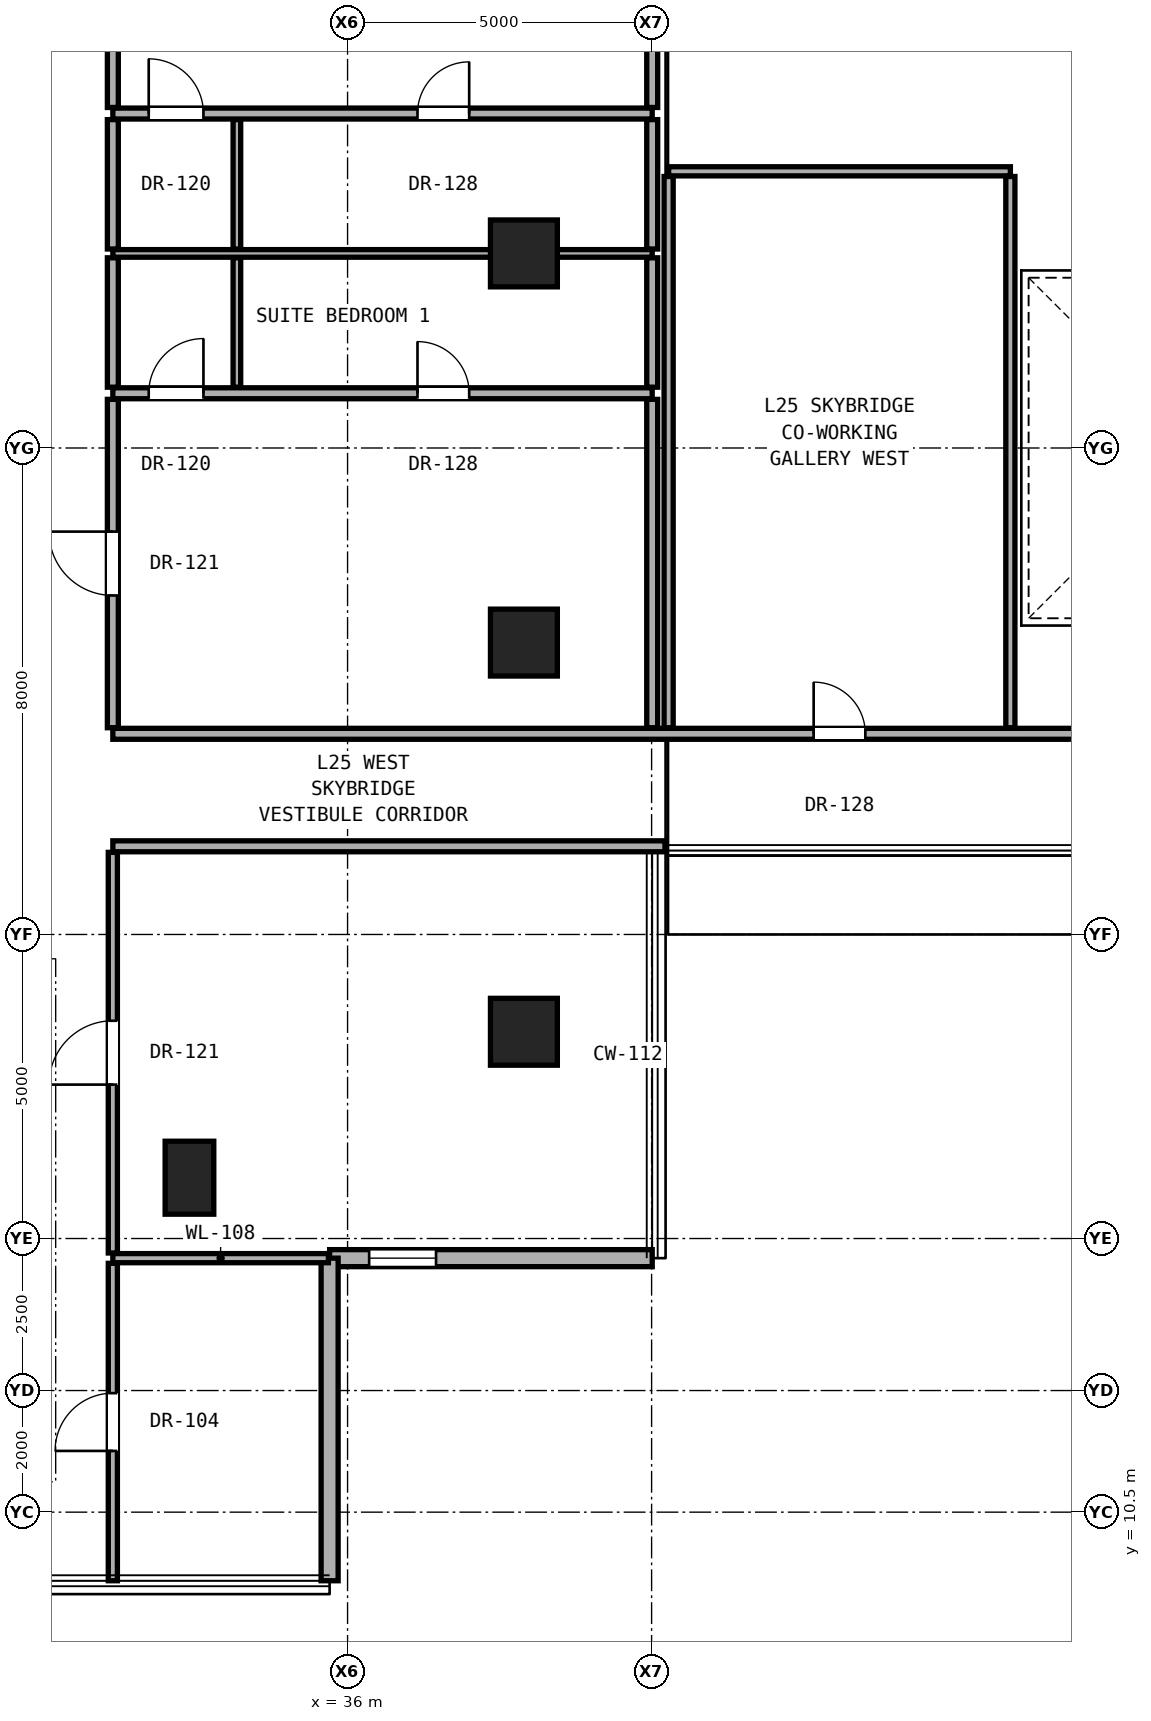
"""IFC4 building model, lengths in metres.
Left out: names, types, materials, properties, quantities, classifications, styles, units other than length and angle.
Written with IfcOpenShell. Run it as: python <this file> out.ifc"""

import sys

from ifc_helpers import new_model, si_unit, direction, frame, frame_2d, origin, origin_2d, place, context, subcontext, project, spatial, rectangle, hollow_rectangle, extrude, element, fill, save


model = new_model("IFC4")
c1 = context("Model", 3, precision=1e-05, world=origin(), true_north=direction((0.0, 1.0)))
c2 = subcontext(c1, "Body", "Model", "MODEL_VIEW")
j1 = project(units=[si_unit("LENGTHUNIT", "METRE"), si_unit("PLANEANGLEUNIT", "RADIAN")], contexts=[c1])
p1 = place(None, origin())
s1 = spatial("IfcSite", under=j1, at=p1, CompositionType="ELEMENT")
p2 = place(p1, origin())
s2 = spatial("IfcBuilding", under=s1, at=p2, CompositionType="ELEMENT")
p3 = place(p2, frame((0.0, 0.0, 91.7)))
s3 = spatial("IfcBuildingStorey", under=s2, at=p3, CompositionType="ELEMENT", Elevation=91.7)
for number, where, z_axis, x_axis in (
    (1, (38.9, 18.4, 0.0), (0.0, 0.0, 1.0), (1.0, 0.0, 0.0)),
    (2, (38.9, 24.8, 0.0), (0.0, 0.0, 1.0), (1.0, 0.0, 0.0)),
    (3, (38.9, 31.2, 0.0), (0.0, 0.0, 1.0), (1.0, 0.0, 0.0)),
):
    element("IfcColumn", number, at=place(p3, frame(where, z_axis=z_axis, x_axis=x_axis)), inside=s3, PredefinedType="COLUMN", context=c2, shape_type="SweptSolid", body=[
        extrude(hollow_rectangle(XDim=1.1, YDim=1.1, WallThickness=0.06, at=origin_2d()), origin(), (0.0, 0.0, 1.0), 3.3),
    ])
p4 = place(p3, frame((33.4, 16.0, 0.0), z_axis=(0.0, 0.0, 1.0), x_axis=(1.0, 0.0, 0.0)))
e4 = element("IfcColumn", 4, at=p4, inside=s3, PredefinedType="PILASTER", context=c2, shape_type="SweptSolid", body=[
    extrude(rectangle(XDim=0.8, YDim=1.2, at=origin_2d()), origin(), (0.0, 0.0, 1.0), 3.3),
])
p5 = place(p3, frame((35.705, 14.677, 0.0), z_axis=(0.0, 0.0, 1.0), x_axis=(1.0, 0.0, 0.0)))
e5 = element("IfcWall", 5, at=p5, inside=s3, PredefinedType="SOLIDWALL", context=c2, shape_type="SweptSolid", body=[
    extrude(rectangle(XDim=5.305, YDim=0.28, at=frame_2d((2.652, 0.0))), origin(), (0.0, 0.0, 1.0), 3.06),
])
p6 = place(p5, frame((0.65, 0.0, 0.85)))
e6 = element("IfcOpeningElement", 6, at=p6, cuts=e5, PredefinedType="OPENING", context=c2, shape_type="SweptSolid", body=[
    extrude(rectangle(XDim=1.1, YDim=2.0, at=frame_2d((0.55, 1.0))), frame((0.0, 0.15, 0.0), z_axis=(0.0, -1.0, 0.0), x_axis=(1.0, 0.0, 0.0)), (0.0, 0.0, 1.0), 0.3),
])
p7 = place(p3, frame((35.705, 9.372, 0.0), z_axis=(0.0, 0.0, 1.0), x_axis=(0.0, 1.0, 0.0)))
e7 = element("IfcWall", 7, at=p7, inside=s3, PredefinedType="SOLIDWALL", context=c2, shape_type="SweptSolid", body=[
    extrude(rectangle(XDim=5.305, YDim=0.28, at=frame_2d((2.652, 0.0))), origin(), (0.0, 0.0, 1.0), 3.06),
])
p8 = place(p3, frame((32.14, 14.677, 0.0), z_axis=(0.0, 0.0, 1.0), x_axis=(1.0, 0.0, 0.0)))
e8 = element("IfcWall", 8, at=p8, inside=s3, PredefinedType="PARTITIONING", context=c2, shape_type="SweptSolid", body=[
    extrude(rectangle(XDim=3.545, YDim=0.15, at=frame_2d((1.772, 0.0))), origin(), (0.0, 0.0, 1.0), 3.08),
])
p9 = place(p3, frame((32.14, 21.45, 0.0), z_axis=(0.0, 0.0, 1.0), x_axis=(1.0, 0.0, 0.0)))
e9 = element("IfcWall", 9, at=p9, inside=s3, PredefinedType="PARTITIONING", context=c2, shape_type="SweptSolid", body=[
    extrude(rectangle(XDim=9.08, YDim=0.18, at=frame_2d((4.54, 0.0))), origin(), (0.0, 0.0, 1.0), 2.085),
])
p10 = place(p3, frame((32.14, 23.3, 0.0), z_axis=(0.0, 0.0, 1.0), x_axis=(1.0, 0.0, 0.0)))
e10 = element("IfcWall", 10, at=p10, inside=s3, PredefinedType="PARTITIONING", context=c2, shape_type="SweptSolid", body=[
    extrude(rectangle(XDim=33.11, YDim=0.18, at=frame_2d((16.555, 0.0))), origin(), (0.0, 0.0, 1.0), 2.145),
])
p11 = place(p10, frame((11.525, 0.0, 0.0)))
e11 = element("IfcOpeningElement", 11, at=p11, cuts=e10, PredefinedType="OPENING", context=c2, shape_type="SweptSolid", body=[
    extrude(rectangle(XDim=0.85, YDim=2.01, at=frame_2d((0.425, 1.005))), frame((0.0, 0.1, 0.0), z_axis=(0.0, -1.0, 0.0), x_axis=(1.0, 0.0, 0.0)), (0.0, 0.0, 1.0), 0.2),
])
p12 = place(p10, frame((23.185, 0.0, 0.0)))
e12 = element("IfcOpeningElement", 12, at=p12, cuts=e10, PredefinedType="OPENING", context=c2, shape_type="SweptSolid", body=[
    extrude(rectangle(XDim=0.85, YDim=2.01, at=frame_2d((0.425, 1.005))), frame((0.0, 0.1, 0.0), z_axis=(0.0, -1.0, 0.0), x_axis=(1.0, 0.0, 0.0)), (0.0, 0.0, 1.0), 0.2),
])
p13 = place(p3, frame((32.14, 28.9, 0.0), z_axis=(0.0, 0.0, 1.0), x_axis=(1.0, 0.0, 0.0)))
e13 = element("IfcWall", 13, at=p13, inside=s3, PredefinedType="PARTITIONING", context=c2, shape_type="SweptSolid", body=[
    extrude(rectangle(XDim=8.87, YDim=0.18, at=frame_2d((4.435, 0.0))), origin(), (0.0, 0.0, 1.0), 2.145),
])
p14 = place(p13, frame((5.01, 0.0, 0.0)))
e14 = element("IfcOpeningElement", 14, at=p14, cuts=e13, PredefinedType="OPENING", context=c2, shape_type="SweptSolid", body=[
    extrude(rectangle(XDim=0.85, YDim=2.01, at=frame_2d((0.425, 1.005))), frame((0.0, 0.1, 0.0), z_axis=(0.0, -1.0, 0.0), x_axis=(1.0, 0.0, 0.0)), (0.0, 0.0, 1.0), 0.2),
])
p15 = place(p13, frame((0.59, 0.0, 0.0)))
e15 = element("IfcOpeningElement", 15, at=p15, cuts=e13, PredefinedType="OPENING", context=c2, shape_type="SweptSolid", body=[
    extrude(rectangle(XDim=0.9, YDim=2.1, at=frame_2d((0.45, 1.05))), frame((0.0, 0.1, 0.0), z_axis=(0.0, -1.0, 0.0), x_axis=(1.0, 0.0, 0.0)), (0.0, 0.0, 1.0), 0.2),
])
p16 = place(p3, frame((32.14, 31.2, 0.0), z_axis=(0.0, 0.0, 1.0), x_axis=(1.0, 0.0, 0.0)))
e16 = element("IfcWall", 16, at=p16, inside=s3, PredefinedType="PARTITIONING", context=c2, shape_type="SweptSolid", body=[
    extrude(rectangle(XDim=8.87, YDim=0.125, at=frame_2d((4.435, 0.0))), origin(), (0.0, 0.0, 1.0), 2.145),
])
p17 = place(p3, frame((41.28, 32.55, 0.0), z_axis=(0.0, 0.0, 1.0), x_axis=(1.0, 0.0, 0.0)))
e17 = element("IfcWall", 17, at=p17, inside=s3, PredefinedType="PARTITIONING", context=c2, shape_type="SweptSolid", body=[
    extrude(rectangle(XDim=5.62, YDim=0.15, at=frame_2d((2.81, 0.0))), origin(), (0.0, 0.0, 1.0), 2.316),
])
p18 = place(p3, frame((32.14, 33.5, 0.0), z_axis=(0.0, 0.0, 1.0), x_axis=(1.0, 0.0, 0.0)))
e18 = element("IfcWall", 18, at=p18, inside=s3, PredefinedType="PARTITIONING", context=c2, shape_type="SweptSolid", body=[
    extrude(rectangle(XDim=8.87, YDim=0.18, at=frame_2d((4.435, 0.0))), origin(), (0.0, 0.0, 1.0), 2.145),
])
p19 = place(p18, frame((5.01, 0.0, 0.0)))
e19 = element("IfcOpeningElement", 19, at=p19, cuts=e18, PredefinedType="OPENING", context=c2, shape_type="SweptSolid", body=[
    extrude(rectangle(XDim=0.85, YDim=2.01, at=frame_2d((0.425, 1.005))), frame((0.0, 0.1, 0.0), z_axis=(0.0, -1.0, 0.0), x_axis=(1.0, 0.0, 0.0)), (0.0, 0.0, 1.0), 0.2),
])
p20 = place(p18, frame((0.59, 0.0, 0.0)))
e20 = element("IfcOpeningElement", 20, at=p20, cuts=e18, PredefinedType="OPENING", context=c2, shape_type="SweptSolid", body=[
    extrude(rectangle(XDim=0.9, YDim=2.1, at=frame_2d((0.45, 1.05))), frame((0.0, 0.1, 0.0), z_axis=(0.0, -1.0, 0.0), x_axis=(1.0, 0.0, 0.0)), (0.0, 0.0, 1.0), 0.2),
])
p21 = place(p3, frame((32.14, 9.372, 0.0), z_axis=(0.0, 0.0, 1.0), x_axis=(0.0, 1.0, 0.0)))
e21 = element("IfcWall", 21, at=p21, inside=s3, PredefinedType="PARTITIONING", context=c2, shape_type="SweptSolid", body=[
    extrude(rectangle(XDim=5.22, YDim=0.15, at=frame_2d((2.61, 0.0))), origin(), (0.0, 0.0, 1.0), 3.08),
])
p22 = place(p21, frame((2.135, 0.0, 0.0)))
e22 = element("IfcOpeningElement", 22, at=p22, cuts=e21, PredefinedType="OPENING", context=c2, shape_type="SweptSolid", body=[
    extrude(rectangle(XDim=0.95, YDim=2.15, at=frame_2d((0.475, 1.075))), frame((0.0, 0.085, 0.0), z_axis=(0.0, -1.0, 0.0), x_axis=(1.0, 0.0, 0.0)), (0.0, 0.0, 1.0), 0.17),
])
p23 = place(p3, frame((32.14, 14.762, 0.0), z_axis=(0.0, 0.0, 1.0), x_axis=(0.0, 1.0, 0.0)))
e23 = element("IfcWall", 23, at=p23, inside=s3, PredefinedType="PARTITIONING", context=c2, shape_type="SweptSolid", body=[
    extrude(rectangle(XDim=6.588, YDim=0.15, at=frame_2d((3.294, 0.0))), origin(), (0.0, 0.0, 1.0), 2.456),
])
p24 = place(p23, frame((2.769, 0.0, 0.0)))
e24 = element("IfcOpeningElement", 24, at=p24, cuts=e23, PredefinedType="OPENING", context=c2, shape_type="SweptSolid", body=[
    extrude(rectangle(XDim=1.05, YDim=2.2, at=frame_2d((0.525, 1.1))), frame((0.0, 0.085, 0.0), z_axis=(0.0, -1.0, 0.0), x_axis=(1.0, 0.0, 0.0)), (0.0, 0.0, 1.0), 0.17),
])
p25 = place(p3, frame((32.14, 23.4, 0.0), z_axis=(0.0, 0.0, 1.0), x_axis=(0.0, 1.0, 0.0)))
e25 = element("IfcWall", 25, at=p25, inside=s3, PredefinedType="PARTITIONING", context=c2, shape_type="SweptSolid", body=[
    extrude(rectangle(XDim=5.4, YDim=0.18, at=frame_2d((2.7, 0.0))), origin(), (0.0, 0.0, 1.0), 2.299),
])
p26 = place(p25, frame((2.175, 0.0, 0.0)))
e26 = element("IfcOpeningElement", 26, at=p26, cuts=e25, PredefinedType="OPENING", context=c2, shape_type="SweptSolid", body=[
    extrude(rectangle(XDim=1.05, YDim=2.2, at=frame_2d((0.525, 1.1))), frame((0.0, 0.1, 0.0), z_axis=(0.0, -1.0, 0.0), x_axis=(1.0, 0.0, 0.0)), (0.0, 0.0, 1.0), 0.2),
])
for number, where, z_axis, x_axis in (
    (27, (32.14, 29.0, 0.0), (0.0, 0.0, 1.0), (0.0, 1.0, 0.0)),
    (28, (32.14, 31.272, 0.0), (0.0, 0.0, 1.0), (0.0, 1.0, 0.0)),
):
    element("IfcWall", number, at=place(p3, frame(where, z_axis=z_axis, x_axis=x_axis)), inside=s3, PredefinedType="PARTITIONING", context=c2, shape_type="SweptSolid", body=[
        extrude(rectangle(XDim=2.127, YDim=0.18, at=frame_2d((1.064, 0.0))), origin(), (0.0, 0.0, 1.0), 2.299),
    ])
p27 = place(p3, frame((32.14, 33.6, 0.0), z_axis=(0.0, 0.0, 1.0), x_axis=(0.0, 1.0, 0.0)))
e29 = element("IfcWall", 29, at=p27, inside=s3, PredefinedType="PARTITIONING", context=c2, shape_type="SweptSolid", body=[
    extrude(rectangle(XDim=7.623, YDim=0.18, at=frame_2d((3.812, 0.0))), origin(), (0.0, 0.0, 1.0), 2.456),
])
p28 = place(p27, frame((3.287, 0.0, 0.0)))
e30 = element("IfcOpeningElement", 30, at=p28, cuts=e29, PredefinedType="OPENING", context=c2, shape_type="SweptSolid", body=[
    extrude(rectangle(XDim=1.05, YDim=2.2, at=frame_2d((0.525, 1.1))), frame((0.0, 0.1, 0.0), z_axis=(0.0, -1.0, 0.0), x_axis=(1.0, 0.0, 0.0)), (0.0, 0.0, 1.0), 0.2),
])
for number, where, z_axis, x_axis in (
    (31, (34.18, 29.0, 0.0), (0.0, 0.0, 1.0), (0.0, 1.0, 0.0)),
    (32, (34.18, 31.272, 0.0), (0.0, 0.0, 1.0), (0.0, 1.0, 0.0)),
):
    element("IfcWall", number, at=place(p3, frame(where, z_axis=z_axis, x_axis=x_axis)), inside=s3, PredefinedType="PARTITIONING", context=c2, shape_type="SweptSolid", body=[
        extrude(rectangle(XDim=2.127, YDim=0.125, at=frame_2d((1.064, 0.0))), origin(), (0.0, 0.0, 1.0), 2.299),
    ])
p29 = place(p3, frame((41.01, 23.4, 0.0), z_axis=(0.0, 0.0, 1.0), x_axis=(0.0, 1.0, 0.0)))
e33 = element("IfcWall", 33, at=p29, inside=s3, PredefinedType="PARTITIONING", context=c2, shape_type="SweptSolid", body=[
    extrude(rectangle(XDim=5.4, YDim=0.18, at=frame_2d((2.7, 0.0))), origin(), (0.0, 0.0, 1.0), 2.085),
])
p30 = place(p3, frame((41.01, 29.0, 0.0), z_axis=(0.0, 0.0, 1.0), x_axis=(0.0, 1.0, 0.0)))
e34 = element("IfcWall", 34, at=p30, inside=s3, PredefinedType="PARTITIONING", context=c2, shape_type="SweptSolid", body=[
    extrude(rectangle(XDim=2.127, YDim=0.18, at=frame_2d((1.064, 0.0))), origin(), (0.0, 0.0, 1.0), 3.08),
])
p31 = place(p3, frame((41.01, 31.272, 0.0), z_axis=(0.0, 0.0, 1.0), x_axis=(0.0, 1.0, 0.0)))
e35 = element("IfcWall", 35, at=p31, inside=s3, PredefinedType="PARTITIONING", context=c2, shape_type="SweptSolid", body=[
    extrude(rectangle(XDim=2.127, YDim=0.18, at=frame_2d((1.064, 0.0))), origin(), (0.0, 0.0, 1.0), 2.085),
])
p32 = place(p3, frame((41.01, 33.6, 0.0), z_axis=(0.0, 0.0, 1.0), x_axis=(0.0, 1.0, 0.0)))
e36 = element("IfcWall", 36, at=p32, inside=s3, PredefinedType="PARTITIONING", context=c2, shape_type="SweptSolid", body=[
    extrude(rectangle(XDim=0.99, YDim=0.18, at=frame_2d((0.495, 0.0))), origin(), (0.0, 0.0, 1.0), 2.085),
])
for number, where, z_axis, x_axis in (
    (37, (41.28, 23.4, 0.0), (0.0, 0.0, 1.0), (0.0, 1.0, 0.0)),
    (38, (46.9, 23.4, 0.0), (0.0, 0.0, 1.0), (0.0, 1.0, 0.0)),
):
    element("IfcWall", number, at=place(p3, frame(where, z_axis=z_axis, x_axis=x_axis)), inside=s3, PredefinedType="PARTITIONING", context=c2, shape_type="SweptSolid", body=[
        extrude(rectangle(XDim=9.065, YDim=0.15, at=frame_2d((4.533, 0.0))), origin(), (0.0, 0.0, 1.0), 2.085),
    ])
p33 = place(p6, origin())
e39 = element("IfcWindow", 39, at=p33, inside=s3, PartitioningType="SINGLE_PANEL", PredefinedType="WINDOW", context=c2, shape_type="SweptSolid", body=[
    extrude(rectangle(XDim=1.1, YDim=2.0, at=frame_2d((0.55, 1.0))), frame((0.0, 0.03, 0.0), z_axis=(0.0, -1.0, 0.0), x_axis=(1.0, 0.0, 0.0)), (0.0, 0.0, 1.0), 0.06),
])
fill(e6, e39)
p34 = place(p26, origin())
e40 = element("IfcDoor", 40, at=p34, inside=s3, OperationType="SINGLE_SWING_RIGHT", PredefinedType="DOOR", context=c2, shape_type="SweptSolid", body=[
    extrude(rectangle(XDim=1.05, YDim=2.2, at=frame_2d((0.525, 1.1))), frame((0.0, 0.025, 0.0), z_axis=(0.0, -1.0, 0.0), x_axis=(1.0, 0.0, 0.0)), (0.0, 0.0, 1.0), 0.05),
])
fill(e26, e40)
p35 = place(p14, origin())
e41 = element("IfcDoor", 41, at=p35, inside=s3, OperationType="SINGLE_SWING_LEFT", PredefinedType="DOOR", context=c2, shape_type="SweptSolid", body=[
    extrude(rectangle(XDim=0.85, YDim=2.01, at=frame_2d((0.425, 1.005))), frame((0.0, 0.025, 0.0), z_axis=(0.0, -1.0, 0.0), x_axis=(1.0, 0.0, 0.0)), (0.0, 0.0, 1.0), 0.05),
])
fill(e14, e41)
p36 = place(p15, origin())
e42 = element("IfcDoor", 42, at=p36, inside=s3, OperationType="SINGLE_SWING_RIGHT", PredefinedType="DOOR", context=c2, shape_type="SweptSolid", body=[
    extrude(rectangle(XDim=0.9, YDim=2.1, at=frame_2d((0.45, 1.05))), frame((0.0, 0.025, 0.0), z_axis=(0.0, -1.0, 0.0), x_axis=(1.0, 0.0, 0.0)), (0.0, 0.0, 1.0), 0.05),
])
fill(e15, e42)
p37 = place(p19, origin())
e43 = element("IfcDoor", 43, at=p37, inside=s3, OperationType="SINGLE_SWING_RIGHT", PredefinedType="DOOR", context=c2, shape_type="SweptSolid", body=[
    extrude(rectangle(XDim=0.85, YDim=2.01, at=frame_2d((0.425, 1.005))), frame((0.0, 0.025, 0.0), z_axis=(0.0, -1.0, 0.0), x_axis=(1.0, 0.0, 0.0)), (0.0, 0.0, 1.0), 0.05),
])
fill(e19, e43)
p38 = place(p20, origin())
e44 = element("IfcDoor", 44, at=p38, inside=s3, OperationType="SINGLE_SWING_LEFT", PredefinedType="DOOR", context=c2, shape_type="SweptSolid", body=[
    extrude(rectangle(XDim=0.9, YDim=2.1, at=frame_2d((0.45, 1.05))), frame((0.0, 0.025, 0.0), z_axis=(0.0, -1.0, 0.0), x_axis=(1.0, 0.0, 0.0)), (0.0, 0.0, 1.0), 0.05),
])
fill(e20, e44)
p39 = place(p22, origin())
e45 = element("IfcDoor", 45, at=p39, inside=s3, OperationType="SINGLE_SWING_LEFT", PredefinedType="DOOR", context=c2, shape_type="SweptSolid", body=[
    extrude(rectangle(XDim=0.95, YDim=2.15, at=frame_2d((0.475, 1.075))), frame((0.0, 0.025, 0.0), z_axis=(0.0, -1.0, 0.0), x_axis=(1.0, 0.0, 0.0)), (0.0, 0.0, 1.0), 0.05),
])
fill(e22, e45)
p40 = place(p24, origin())
e46 = element("IfcDoor", 46, at=p40, inside=s3, OperationType="SINGLE_SWING_LEFT", PredefinedType="DOOR", context=c2, shape_type="SweptSolid", body=[
    extrude(rectangle(XDim=1.05, YDim=2.2, at=frame_2d((0.525, 1.1))), frame((0.0, 0.025, 0.0), z_axis=(0.0, -1.0, 0.0), x_axis=(1.0, 0.0, 0.0)), (0.0, 0.0, 1.0), 0.05),
])
fill(e24, e46)
p41 = place(p11, origin())
e47 = element("IfcDoor", 47, at=p41, inside=s3, OperationType="SINGLE_SWING_LEFT", PredefinedType="DOOR", context=c2, shape_type="SweptSolid", body=[
    extrude(rectangle(XDim=0.85, YDim=2.01, at=frame_2d((0.425, 1.005))), frame((0.0, 0.025, 0.0), z_axis=(0.0, -1.0, 0.0), x_axis=(1.0, 0.0, 0.0)), (0.0, 0.0, 1.0), 0.05),
])
fill(e11, e47)
save(model, sys.argv[1])
